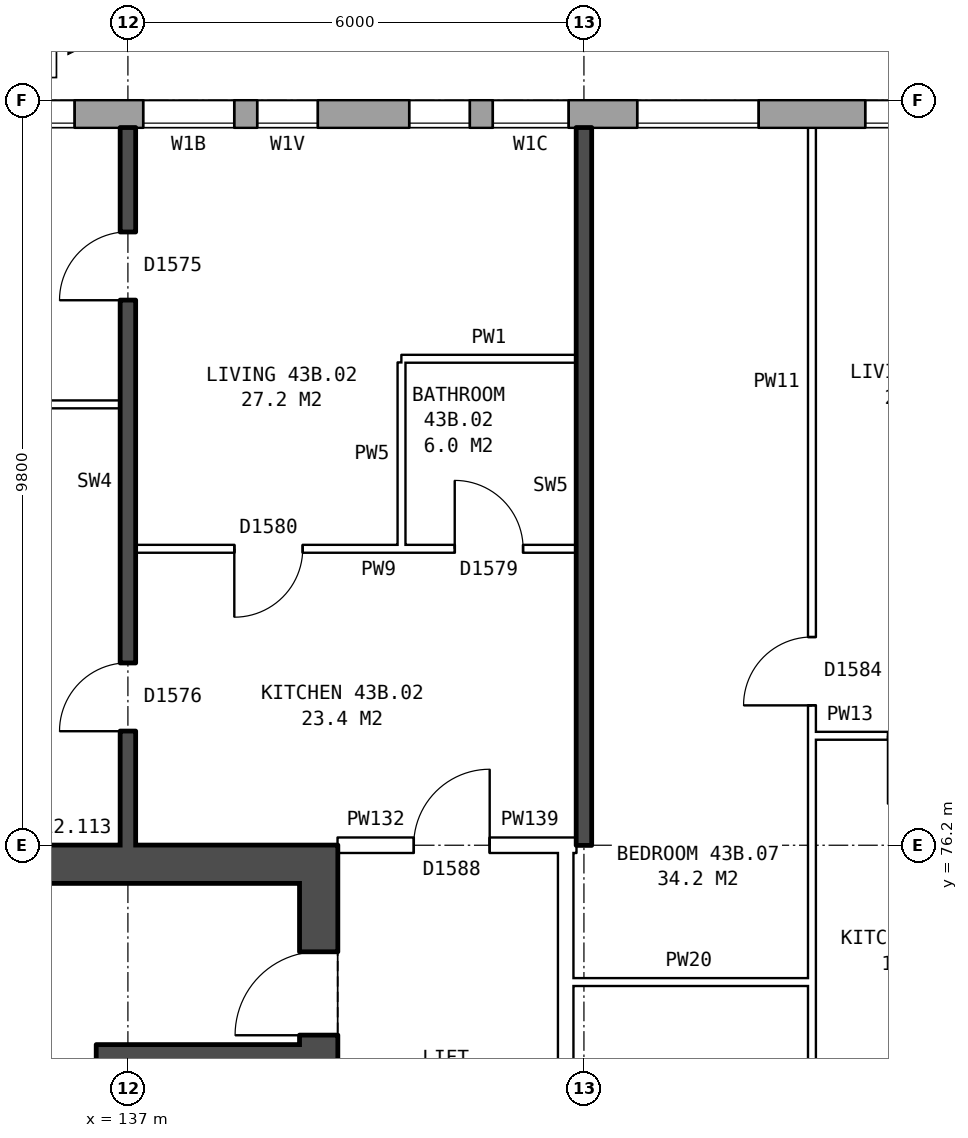
"""IFC4 building model, lengths in metres.
Left out: names, types, materials, properties, quantities, classifications, styles, units other than length and angle.
Written with IfcOpenShell. Run it as: python <this file> out.ifc"""

import sys

from ifc_helpers import new_model, si_unit, direction, frame, frame_2d, origin, place, context, subcontext, project, spatial, rectangle, extrude, element, fill, save


model = new_model("IFC4")
c1 = context("Model", 3, precision=1e-05, world=origin(), true_north=direction((0.0, 1.0)))
c2 = subcontext(c1, "Body", "Model", "MODEL_VIEW")
j1 = project(units=[si_unit("LENGTHUNIT", "METRE"), si_unit("PLANEANGLEUNIT", "RADIAN")], contexts=[c1])
p1 = place(None, origin())
s1 = spatial("IfcSite", under=j1, at=p1, CompositionType="ELEMENT")
p2 = place(p1, origin())
s2 = spatial("IfcBuilding", under=s1, at=p2, CompositionType="ELEMENT")
p3 = place(p2, frame((0.0, 0.0, 154.7)))
s3 = spatial("IfcBuildingStorey", under=s2, at=p3, CompositionType="ELEMENT", Elevation=154.7)
p4 = place(p3, frame((168.425, 85.82, 0.0), z_axis=(0.0, 0.0, 1.0), x_axis=(-1.0, 0.0, 0.0)))
e1 = element("IfcWall", 1, at=p4, inside=s3, PredefinedType="STANDARD", context=c2, shape_type="SweptSolid", body=[
    extrude(rectangle(XDim=34.351, YDim=0.36, at=frame_2d((17.175, 0.0))), origin(), (0.0, 0.0, 1.0), 2.85),
])
p5 = place(p4, frame((2.125, 0.0, 0.8)))
e2 = element("IfcOpeningElement", 2, at=p5, cuts=e1, PredefinedType="OPENING", context=c2, shape_type="SweptSolid", body=[
    extrude(rectangle(XDim=1.6, YDim=1.8, at=frame_2d((0.8, 0.9))), frame((0.0, 0.19, 0.0), z_axis=(0.0, -1.0, 0.0), x_axis=(1.0, 0.0, 0.0)), (0.0, 0.0, 1.0), 0.38),
])
p6 = place(p4, frame((4.025, 0.0, 1.7)))
e3 = element("IfcOpeningElement", 3, at=p6, cuts=e1, PredefinedType="OPENING", context=c2, shape_type="SweptSolid", body=[
    extrude(rectangle(XDim=1.4, YDim=0.9, at=frame_2d((0.7, 0.45))), frame((0.0, 0.19, 0.0), z_axis=(0.0, -1.0, 0.0), x_axis=(1.0, 0.0, 0.0)), (0.0, 0.0, 1.0), 0.38),
])
p7 = place(p4, frame((8.125, 0.0, 0.8)))
e4 = element("IfcOpeningElement", 4, at=p7, cuts=e1, PredefinedType="OPENING", context=c2, shape_type="SweptSolid", body=[
    extrude(rectangle(XDim=1.6, YDim=1.8, at=frame_2d((0.8, 0.9))), frame((0.0, 0.19, 0.0), z_axis=(0.0, -1.0, 0.0), x_axis=(1.0, 0.0, 0.0)), (0.0, 0.0, 1.0), 0.38),
])
p8 = place(p4, frame((11.125, 0.0, 0.8)))
e5 = element("IfcOpeningElement", 5, at=p8, cuts=e1, PredefinedType="OPENING", context=c2, shape_type="SweptSolid", body=[
    extrude(rectangle(XDim=1.6, YDim=1.8, at=frame_2d((0.8, 0.9))), frame((0.0, 0.19, 0.0), z_axis=(0.0, -1.0, 0.0), x_axis=(1.0, 0.0, 0.0)), (0.0, 0.0, 1.0), 0.38),
])
p9 = place(p4, frame((14.125, 0.0, 0.8)))
e6 = element("IfcOpeningElement", 6, at=p9, cuts=e1, PredefinedType="OPENING", context=c2, shape_type="SweptSolid", body=[
    extrude(rectangle(XDim=1.6, YDim=1.8, at=frame_2d((0.8, 0.9))), frame((0.0, 0.19, 0.0), z_axis=(0.0, -1.0, 0.0), x_axis=(1.0, 0.0, 0.0)), (0.0, 0.0, 1.0), 0.38),
])
p10 = place(p4, frame((17.125, 0.0, 0.8)))
e7 = element("IfcOpeningElement", 7, at=p10, cuts=e1, PredefinedType="OPENING", context=c2, shape_type="SweptSolid", body=[
    extrude(rectangle(XDim=1.6, YDim=1.8, at=frame_2d((0.8, 0.9))), frame((0.0, 0.19, 0.0), z_axis=(0.0, -1.0, 0.0), x_axis=(1.0, 0.0, 0.0)), (0.0, 0.0, 1.0), 0.38),
])
p11 = place(p4, frame((20.125, 0.0, 0.8)))
e8 = element("IfcOpeningElement", 8, at=p11, cuts=e1, PredefinedType="OPENING", context=c2, shape_type="SweptSolid", body=[
    extrude(rectangle(XDim=1.6, YDim=1.8, at=frame_2d((0.8, 0.9))), frame((0.0, 0.19, 0.0), z_axis=(0.0, -1.0, 0.0), x_axis=(1.0, 0.0, 0.0)), (0.0, 0.0, 1.0), 0.38),
])
p12 = place(p4, frame((23.125, 0.0, 0.8)))
e9 = element("IfcOpeningElement", 9, at=p12, cuts=e1, PredefinedType="OPENING", context=c2, shape_type="SweptSolid", body=[
    extrude(rectangle(XDim=1.6, YDim=1.8, at=frame_2d((0.8, 0.9))), frame((0.0, 0.19, 0.0), z_axis=(0.0, -1.0, 0.0), x_axis=(1.0, 0.0, 0.0)), (0.0, 0.0, 1.0), 0.38),
])
p13 = place(p4, frame((25.625, 0.0, 0.8)))
e10 = element("IfcOpeningElement", 10, at=p13, cuts=e1, PredefinedType="OPENING", context=c2, shape_type="SweptSolid", body=[
    extrude(rectangle(XDim=1.0, YDim=1.8, at=frame_2d((0.5, 0.9))), frame((0.0, 0.19, 0.0), z_axis=(0.0, -1.0, 0.0), x_axis=(1.0, 0.0, 0.0)), (0.0, 0.0, 1.0), 0.38),
])
p14 = place(p4, frame((26.925, 0.0, 0.8)))
e11 = element("IfcOpeningElement", 11, at=p14, cuts=e1, PredefinedType="OPENING", context=c2, shape_type="SweptSolid", body=[
    extrude(rectangle(XDim=0.8, YDim=0.9, at=frame_2d((0.4, 0.45))), frame((0.0, 0.19, 0.0), z_axis=(0.0, -1.0, 0.0), x_axis=(1.0, 0.0, 0.0)), (0.0, 0.0, 1.0), 0.38),
])
p15 = place(p4, frame((32.125, 0.0, 0.8)))
e12 = element("IfcOpeningElement", 12, at=p15, cuts=e1, PredefinedType="OPENING", context=c2, shape_type="SweptSolid", body=[
    extrude(rectangle(XDim=1.6, YDim=1.8, at=frame_2d((0.8, 0.9))), frame((0.0, 0.19, 0.0), z_axis=(0.0, -1.0, 0.0), x_axis=(1.0, 0.0, 0.0)), (0.0, 0.0, 1.0), 0.38),
])
p16 = place(p4, frame((6.625, 0.0, 0.8)))
e13 = element("IfcOpeningElement", 13, at=p16, cuts=e1, PredefinedType="OPENING", context=c2, shape_type="SweptSolid", body=[
    extrude(rectangle(XDim=0.6, YDim=0.9, at=frame_2d((0.3, 0.45))), frame((0.0, 0.19, 0.0), z_axis=(0.0, -1.0, 0.0), x_axis=(1.0, 0.0, 0.0)), (0.0, 0.0, 1.0), 0.38),
])
p17 = place(p4, frame((28.925, 0.0, 1.7)))
e14 = element("IfcOpeningElement", 14, at=p17, cuts=e1, PredefinedType="OPENING", context=c2, shape_type="SweptSolid", body=[
    extrude(rectangle(XDim=0.8, YDim=0.9, at=frame_2d((0.4, 0.45))), frame((0.0, 0.19, 0.0), z_axis=(0.0, -1.0, 0.0), x_axis=(1.0, 0.0, 0.0)), (0.0, 0.0, 1.0), 0.38),
])
p18 = place(p4, frame((30.025, 0.0, 0.8)))
e15 = element("IfcOpeningElement", 15, at=p18, cuts=e1, PredefinedType="OPENING", context=c2, shape_type="SweptSolid", body=[
    extrude(rectangle(XDim=1.2, YDim=1.8, at=frame_2d((0.6, 0.9))), frame((0.0, 0.19, 0.0), z_axis=(0.0, -1.0, 0.0), x_axis=(1.0, 0.0, 0.0)), (0.0, 0.0, 1.0), 0.38),
])
p19 = place(p3, frame((139.51, 63.8, 0.0), z_axis=(0.0, 0.0, 1.0), x_axis=(0.0, 1.0, 0.0)))
e16 = element("IfcWall", 16, at=p19, inside=s3, PredefinedType="SHEAR", context=c2, shape_type="SweptSolid", body=[
    extrude(rectangle(XDim=12.4, YDim=0.5, at=frame_2d((6.2, 0.0))), origin(), (0.0, 0.0, 1.0), 2.85),
])
p20 = place(p19, frame((1.325, 0.0, 0.0)))
e17 = element("IfcOpeningElement", 17, at=p20, cuts=e16, PredefinedType="OPENING", context=c2, shape_type="SweptSolid", body=[
    extrude(rectangle(XDim=1.1, YDim=2.1, at=frame_2d((0.55, 1.05))), frame((0.0, 0.26, 0.0), z_axis=(0.0, -1.0, 0.0), x_axis=(1.0, 0.0, 0.0)), (0.0, 0.0, 1.0), 0.52),
])
p21 = place(p19, frame((3.6, 0.0, 0.0)))
e18 = element("IfcOpeningElement", 18, at=p21, cuts=e16, PredefinedType="OPENING", context=c2, shape_type="SweptSolid", body=[
    extrude(rectangle(XDim=1.1, YDim=2.1, at=frame_2d((0.55, 1.05))), frame((0.0, 0.26, 0.0), z_axis=(0.0, -1.0, 0.0), x_axis=(1.0, 0.0, 0.0)), (0.0, 0.0, 1.0), 0.52),
])
p22 = place(p19, frame((5.8, 0.0, 0.0)))
e19 = element("IfcOpeningElement", 19, at=p22, cuts=e16, PredefinedType="OPENING", context=c2, shape_type="SweptSolid", body=[
    extrude(rectangle(XDim=1.1, YDim=2.1, at=frame_2d((0.55, 1.05))), frame((0.0, 0.26, 0.0), z_axis=(0.0, -1.0, 0.0), x_axis=(1.0, 0.0, 0.0)), (0.0, 0.0, 1.0), 0.52),
])
p23 = place(p19, frame((9.9, 0.0, 0.0)))
e20 = element("IfcOpeningElement", 20, at=p23, cuts=e16, PredefinedType="OPENING", context=c2, shape_type="SweptSolid", body=[
    extrude(rectangle(XDim=1.1, YDim=2.1, at=frame_2d((0.55, 1.05))), frame((0.0, 0.26, 0.0), z_axis=(0.0, -1.0, 0.0), x_axis=(1.0, 0.0, 0.0)), (0.0, 0.0, 1.0), 0.52),
])
p24 = place(p19, frame((8.125, 0.0, 0.0)))
e21 = element("IfcOpeningElement", 21, at=p24, cuts=e16, PredefinedType="OPENING", context=c2, shape_type="SweptSolid", body=[
    extrude(rectangle(XDim=0.85, YDim=2.1, at=frame_2d((0.425, 1.05))), frame((0.0, 0.26, 0.0), z_axis=(0.0, -1.0, 0.0), x_axis=(1.0, 0.0, 0.0)), (0.0, 0.0, 1.0), 0.52),
])
p25 = place(p3, frame((139.26, 75.95, 0.0), z_axis=(0.0, 0.0, 1.0), x_axis=(-1.0, 0.0, 0.0)))
e22 = element("IfcWall", 22, at=p25, inside=s3, PredefinedType="SHEAR", context=c2, shape_type="SweptSolid", body=[
    extrude(rectangle(XDim=7.4, YDim=0.5, at=frame_2d((3.7, 0.0))), origin(), (0.0, 0.0, 1.0), 2.85),
])
p26 = place(p3, frame((139.26, 73.45, 0.0), z_axis=(0.0, 0.0, 1.0), x_axis=(-1.0, 0.0, 0.0)))
e23 = element("IfcWall", 23, at=p26, inside=s3, PredefinedType="SHEAR", context=c2, shape_type="SweptSolid", body=[
    extrude(rectangle(XDim=2.425, YDim=0.25, at=frame_2d((1.212, 0.0))), origin(), (0.0, 0.0, 1.0), 2.85),
])
p27 = place(p3, frame((136.71, 71.375, 0.0), z_axis=(0.0, 0.0, 1.0), x_axis=(0.0, 1.0, 0.0)))
e24 = element("IfcWall", 24, at=p27, inside=s3, PredefinedType="SHEAR", context=c2, shape_type="SweptSolid", body=[
    extrude(rectangle(XDim=2.2, YDim=0.25, at=frame_2d((1.1, 0.0))), origin(), (0.0, 0.0, 1.0), 2.85),
])
p28 = place(p3, frame((142.76, 63.9, 0.0), z_axis=(0.0, 0.0, 1.0), x_axis=(0.0, 1.0, 0.0)))
e25 = element("IfcWall", 25, at=p28, inside=s3, PredefinedType="PARTITIONING", context=c2, shape_type="SweptSolid", body=[
    extrude(rectangle(XDim=12.2, YDim=0.2, at=frame_2d((6.1, 0.0))), origin(), (0.0, 0.0, 1.0), 2.85),
])
p29 = place(p28, frame((5.1, 0.0, 0.0)))
e26 = element("IfcOpeningElement", 26, at=p29, cuts=e25, PredefinedType="OPENING", context=c2, shape_type="SweptSolid", body=[
    extrude(rectangle(XDim=2.0, YDim=2.1, at=frame_2d((1.0, 1.05))), frame((0.0, 0.11, 0.0), z_axis=(0.0, -1.0, 0.0), x_axis=(1.0, 0.0, 0.0)), (0.0, 0.0, 1.0), 0.22),
])
p30 = place(p3, frame((142.76, 74.4, 0.0), z_axis=(0.0, 0.0, 1.0), x_axis=(1.0, 0.0, 0.0)))
e27 = element("IfcWall", 27, at=p30, inside=s3, PredefinedType="PARTITIONING", context=c2, shape_type="SweptSolid", body=[
    extrude(rectangle(XDim=3.24, YDim=0.1, at=frame_2d((1.62, 0.0))), origin(), (0.0, 0.0, 1.0), 2.85),
])
p31 = place(p3, frame((139.76, 76.2, 0.0), z_axis=(0.0, 0.0, 1.0), x_axis=(1.0, 0.0, 0.0)))
e28 = element("IfcWall", 28, at=p31, inside=s3, PredefinedType="PARTITIONING", context=c2, shape_type="SweptSolid", body=[
    extrude(rectangle(XDim=3.0, YDim=0.2, at=frame_2d((1.5, 0.0))), origin(), (0.0, 0.0, 1.0), 2.85),
])
p32 = place(p31, frame((1.0, 0.0, 0.0)))
e29 = element("IfcOpeningElement", 29, at=p32, cuts=e28, PredefinedType="OPENING", context=c2, shape_type="SweptSolid", body=[
    extrude(rectangle(XDim=1.0, YDim=2.1, at=frame_2d((0.5, 1.05))), frame((0.0, 0.11, 0.0), z_axis=(0.0, -1.0, 0.0), x_axis=(1.0, 0.0, 0.0)), (0.0, 0.0, 1.0), 0.22),
])
p33 = place(p3, frame((142.76, 76.2, 0.0), z_axis=(0.0, 0.0, 1.0), x_axis=(1.0, 0.0, 0.0)))
e30 = element("IfcWall", 30, at=p33, inside=s3, PredefinedType="PARTITIONING", context=c2, shape_type="SweptSolid", body=[
    extrude(rectangle(XDim=0.14, YDim=0.2, at=frame_2d((0.07, 0.0))), origin(), (0.0, 0.0, 1.0), 2.85),
])
p34 = place(p3, frame((146.0, 77.64, 0.0), z_axis=(0.0, 0.0, 1.0), x_axis=(1.0, 0.0, 0.0)))
e31 = element("IfcWall", 31, at=p34, inside=s3, PredefinedType="PARTITIONING", context=c2, shape_type="SweptSolid", body=[
    extrude(rectangle(XDim=2.9, YDim=0.1, at=frame_2d((1.45, 0.0))), origin(), (0.0, 0.0, 1.0), 2.85),
])
p35 = place(p34, frame((1.0, 0.0, 0.0)))
e32 = element("IfcOpeningElement", 32, at=p35, cuts=e31, PredefinedType="OPENING", context=c2, shape_type="SweptSolid", body=[
    extrude(rectangle(XDim=0.9, YDim=2.1, at=frame_2d((0.45, 1.05))), frame((0.0, 0.06, 0.0), z_axis=(0.0, -1.0, 0.0), x_axis=(1.0, 0.0, 0.0)), (0.0, 0.0, 1.0), 0.12),
])
p36 = place(p3, frame((137.1, 80.1, 0.0), z_axis=(0.0, 0.0, 1.0), x_axis=(1.0, 0.0, 0.0)))
e33 = element("IfcWall", 33, at=p36, inside=s3, PredefinedType="PARTITIONING", context=c2, shape_type="SweptSolid", body=[
    extrude(rectangle(XDim=5.8, YDim=0.1, at=frame_2d((2.9, 0.0))), origin(), (0.0, 0.0, 1.0), 2.85),
])
p37 = place(p36, frame((1.3, 0.0, 0.0)))
e34 = element("IfcOpeningElement", 34, at=p37, cuts=e33, PredefinedType="OPENING", context=c2, shape_type="SweptSolid", body=[
    extrude(rectangle(XDim=0.9, YDim=2.1, at=frame_2d((0.45, 1.05))), frame((0.0, 0.06, 0.0), z_axis=(0.0, -1.0, 0.0), x_axis=(1.0, 0.0, 0.0)), (0.0, 0.0, 1.0), 0.12),
])
p38 = place(p36, frame((4.2, 0.0, 0.0)))
e35 = element("IfcOpeningElement", 35, at=p38, cuts=e33, PredefinedType="OPENING", context=c2, shape_type="SweptSolid", body=[
    extrude(rectangle(XDim=0.9, YDim=2.1, at=frame_2d((0.45, 1.05))), frame((0.0, 0.06, 0.0), z_axis=(0.0, -1.0, 0.0), x_axis=(1.0, 0.0, 0.0)), (0.0, 0.0, 1.0), 0.12),
])
p39 = place(p3, frame((131.36, 82.0, 0.0), z_axis=(0.0, 0.0, 1.0), x_axis=(1.0, 0.0, 0.0)))
e36 = element("IfcWall", 36, at=p39, inside=s3, PredefinedType="PARTITIONING", context=c2, shape_type="SweptSolid", body=[
    extrude(rectangle(XDim=5.54, YDim=0.1, at=frame_2d((2.77, 0.0))), origin(), (0.0, 0.0, 1.0), 2.85),
])
p40 = place(p3, frame((140.6, 82.6, 0.0), z_axis=(0.0, 0.0, 1.0), x_axis=(1.0, 0.0, 0.0)))
e37 = element("IfcWall", 37, at=p40, inside=s3, PredefinedType="PARTITIONING", context=c2, shape_type="SweptSolid", body=[
    extrude(rectangle(XDim=2.3, YDim=0.1, at=frame_2d((1.15, 0.0))), origin(), (0.0, 0.0, 1.0), 2.85),
])
p41 = place(p3, frame((137.0, 76.2, 0.0), z_axis=(0.0, 0.0, 1.0), x_axis=(0.0, 1.0, 0.0)))
e38 = element("IfcWall", 38, at=p41, inside=s3, PredefinedType="SOLIDWALL", context=c2, shape_type="SweptSolid", body=[
    extrude(rectangle(XDim=9.44, YDim=0.2, at=frame_2d((4.72, 0.0))), origin(), (0.0, 0.0, 1.0), 2.85),
])
p42 = place(p41, frame((7.17, 0.0, 0.0)))
e39 = element("IfcOpeningElement", 39, at=p42, cuts=e38, PredefinedType="OPENING", context=c2, shape_type="SweptSolid", body=[
    extrude(rectangle(XDim=0.9, YDim=2.1, at=frame_2d((0.45, 1.05))), frame((0.0, 0.11, 0.0), z_axis=(0.0, -1.0, 0.0), x_axis=(1.0, 0.0, 0.0)), (0.0, 0.0, 1.0), 0.22),
])
p43 = place(p41, frame((1.5, 0.0, 0.0)))
e40 = element("IfcOpeningElement", 40, at=p43, cuts=e38, PredefinedType="OPENING", context=c2, shape_type="SweptSolid", body=[
    extrude(rectangle(XDim=0.9, YDim=2.1, at=frame_2d((0.45, 1.05))), frame((0.0, 0.11, 0.0), z_axis=(0.0, -1.0, 0.0), x_axis=(1.0, 0.0, 0.0)), (0.0, 0.0, 1.0), 0.22),
])
p44 = place(p3, frame((140.6, 80.15, 0.0), z_axis=(0.0, 0.0, 1.0), x_axis=(0.0, 1.0, 0.0)))
e41 = element("IfcWall", 41, at=p44, inside=s3, PredefinedType="PARTITIONING", context=c2, shape_type="SweptSolid", body=[
    extrude(rectangle(XDim=2.4, YDim=0.1, at=frame_2d((1.2, 0.0))), origin(), (0.0, 0.0, 1.0), 2.85),
])
p45 = place(p3, frame((143.0, 76.2, 0.0), z_axis=(0.0, 0.0, 1.0), x_axis=(0.0, 1.0, 0.0)))
e42 = element("IfcWall", 42, at=p45, inside=s3, PredefinedType="SOLIDWALL", context=c2, shape_type="SweptSolid", body=[
    extrude(rectangle(XDim=9.44, YDim=0.2, at=frame_2d((4.72, 0.0))), origin(), (0.0, 0.0, 1.0), 2.85),
])
p46 = place(p3, frame((146.0, 71.3, 0.0), z_axis=(0.0, 0.0, 1.0), x_axis=(0.0, 1.0, 0.0)))
e43 = element("IfcWall", 43, at=p46, inside=s3, PredefinedType="PARTITIONING", context=c2, shape_type="SweptSolid", body=[
    extrude(rectangle(XDim=14.34, YDim=0.1, at=frame_2d((7.17, 0.0))), origin(), (0.0, 0.0, 1.0), 2.85),
])
p47 = place(p46, frame((6.74, 0.0, 0.0)))
e44 = element("IfcOpeningElement", 44, at=p47, cuts=e43, PredefinedType="OPENING", context=c2, shape_type="SweptSolid", body=[
    extrude(rectangle(XDim=0.9, YDim=2.1, at=frame_2d((0.45, 1.05))), frame((0.0, 0.06, 0.0), z_axis=(0.0, -1.0, 0.0), x_axis=(1.0, 0.0, 0.0)), (0.0, 0.0, 1.0), 0.12),
])
p48 = place(p46, frame((0.4, 0.0, 0.0)))
e45 = element("IfcOpeningElement", 45, at=p48, cuts=e43, PredefinedType="OPENING", context=c2, shape_type="SweptSolid", body=[
    extrude(rectangle(XDim=0.9, YDim=2.1, at=frame_2d((0.45, 1.05))), frame((0.0, 0.06, 0.0), z_axis=(0.0, -1.0, 0.0), x_axis=(1.0, 0.0, 0.0)), (0.0, 0.0, 1.0), 0.12),
])
p49 = place(p11, origin())
e46 = element("IfcWindow", 46, at=p49, inside=s3, PartitioningType="SINGLE_PANEL", PredefinedType="WINDOW", context=c2, shape_type="SweptSolid", body=[
    extrude(rectangle(XDim=1.6, YDim=1.8, at=frame_2d((0.8, 0.9))), frame((0.0, 0.15, 0.0), z_axis=(0.0, -1.0, 0.0), x_axis=(1.0, 0.0, 0.0)), (0.0, 0.0, 1.0), 0.06),
])
fill(e8, e46)
p50 = place(p12, origin())
e47 = element("IfcWindow", 47, at=p50, inside=s3, PartitioningType="SINGLE_PANEL", PredefinedType="WINDOW", context=c2, shape_type="SweptSolid", body=[
    extrude(rectangle(XDim=1.6, YDim=1.8, at=frame_2d((0.8, 0.9))), frame((0.0, 0.15, 0.0), z_axis=(0.0, -1.0, 0.0), x_axis=(1.0, 0.0, 0.0)), (0.0, 0.0, 1.0), 0.06),
])
fill(e9, e47)
p51 = place(p13, origin())
e48 = element("IfcWindow", 48, at=p51, inside=s3, PartitioningType="SINGLE_PANEL", PredefinedType="WINDOW", context=c2, shape_type="SweptSolid", body=[
    extrude(rectangle(XDim=1.0, YDim=1.8, at=frame_2d((0.5, 0.9))), frame((0.0, 0.15, 0.0), z_axis=(0.0, -1.0, 0.0), x_axis=(1.0, 0.0, 0.0)), (0.0, 0.0, 1.0), 0.06),
])
fill(e10, e48)
p52 = place(p14, origin())
e49 = element("IfcWindow", 49, at=p52, inside=s3, PartitioningType="SINGLE_PANEL", PredefinedType="WINDOW", context=c2, shape_type="SweptSolid", body=[
    extrude(rectangle(XDim=0.8, YDim=0.9, at=frame_2d((0.4, 0.45))), frame((0.0, 0.15, 0.0), z_axis=(0.0, -1.0, 0.0), x_axis=(1.0, 0.0, 0.0)), (0.0, 0.0, 1.0), 0.06),
])
fill(e11, e49)
p53 = place(p15, origin())
e50 = element("IfcWindow", 50, at=p53, inside=s3, PartitioningType="SINGLE_PANEL", PredefinedType="WINDOW", context=c2, shape_type="SweptSolid", body=[
    extrude(rectangle(XDim=1.6, YDim=1.8, at=frame_2d((0.8, 0.9))), frame((0.0, 0.15, 0.0), z_axis=(0.0, -1.0, 0.0), x_axis=(1.0, 0.0, 0.0)), (0.0, 0.0, 1.0), 0.06),
])
fill(e12, e50)
p54 = place(p23, origin())
e51 = element("IfcDoor", 51, at=p54, inside=s3, OperationType="SINGLE_SWING_LEFT", PredefinedType="DOOR", context=c2, shape_type="SweptSolid", body=[
    extrude(rectangle(XDim=1.1, YDim=2.1, at=frame_2d((0.55, 1.05))), frame((0.0, 0.235, 0.0), z_axis=(0.0, -1.0, 0.0), x_axis=(1.0, 0.0, 0.0)), (0.0, 0.0, 1.0), 0.05),
])
fill(e20, e51)
p55 = place(p42, origin())
e52 = element("IfcDoor", 52, at=p55, inside=s3, OperationType="SINGLE_SWING_LEFT", PredefinedType="DOOR", context=c2, shape_type="SweptSolid", body=[
    extrude(rectangle(XDim=0.9, YDim=2.1, at=frame_2d((0.45, 1.05))), frame((0.0, 0.025, 0.0), z_axis=(0.0, -1.0, 0.0), x_axis=(1.0, 0.0, 0.0)), (0.0, 0.0, 1.0), 0.05),
])
fill(e39, e52)
p56 = place(p43, origin())
e53 = element("IfcDoor", 53, at=p56, inside=s3, OperationType="SINGLE_SWING_LEFT", PredefinedType="DOOR", context=c2, shape_type="SweptSolid", body=[
    extrude(rectangle(XDim=0.9, YDim=2.1, at=frame_2d((0.45, 1.05))), frame((0.0, 0.025, 0.0), z_axis=(0.0, -1.0, 0.0), x_axis=(1.0, 0.0, 0.0)), (0.0, 0.0, 1.0), 0.05),
])
fill(e40, e53)
p57 = place(p32, origin())
e54 = element("IfcDoor", 54, at=p57, inside=s3, OperationType="SINGLE_SWING_RIGHT", PredefinedType="DOOR", context=c2, shape_type="SweptSolid", body=[
    extrude(rectangle(XDim=1.0, YDim=2.1, at=frame_2d((0.5, 1.05))), frame((0.0, 0.025, 0.0), z_axis=(0.0, -1.0, 0.0), x_axis=(1.0, 0.0, 0.0)), (0.0, 0.0, 1.0), 0.05),
])
fill(e29, e54)
p58 = place(p37, frame((0.9, 0.0, 0.0), z_axis=(0.0, 0.0, 1.0), x_axis=(-1.0, 0.0, 0.0)))
e55 = element("IfcDoor", 55, at=p58, inside=s3, OperationType="SINGLE_SWING_RIGHT", PredefinedType="DOOR", context=c2, shape_type="SweptSolid", body=[
    extrude(rectangle(XDim=0.9, YDim=2.1, at=frame_2d((0.45, 1.05))), frame((0.0, 0.025, 0.0), z_axis=(0.0, -1.0, 0.0), x_axis=(1.0, 0.0, 0.0)), (0.0, 0.0, 1.0), 0.05),
])
fill(e34, e55)
p59 = place(p38, origin())
e56 = element("IfcDoor", 56, at=p59, inside=s3, OperationType="SINGLE_SWING_LEFT", PredefinedType="DOOR", context=c2, shape_type="SweptSolid", body=[
    extrude(rectangle(XDim=0.9, YDim=2.1, at=frame_2d((0.45, 1.05))), frame((0.0, 0.025, 0.0), z_axis=(0.0, -1.0, 0.0), x_axis=(1.0, 0.0, 0.0)), (0.0, 0.0, 1.0), 0.05),
])
fill(e35, e56)
p60 = place(p47, origin())
e57 = element("IfcDoor", 57, at=p60, inside=s3, OperationType="SINGLE_SWING_LEFT", PredefinedType="DOOR", context=c2, shape_type="SweptSolid", body=[
    extrude(rectangle(XDim=0.9, YDim=2.1, at=frame_2d((0.45, 1.05))), frame((0.0, 0.025, 0.0), z_axis=(0.0, -1.0, 0.0), x_axis=(1.0, 0.0, 0.0)), (0.0, 0.0, 1.0), 0.05),
])
fill(e44, e57)
p61 = place(p17, origin())
e58 = element("IfcWindow", 58, at=p61, inside=s3, PartitioningType="SINGLE_PANEL", PredefinedType="WINDOW", context=c2, shape_type="SweptSolid", body=[
    extrude(rectangle(XDim=0.8, YDim=0.9, at=frame_2d((0.4, 0.45))), frame((0.0, 0.15, 0.0), z_axis=(0.0, -1.0, 0.0), x_axis=(1.0, 0.0, 0.0)), (0.0, 0.0, 1.0), 0.06),
])
fill(e14, e58)
p62 = place(p18, origin())
e59 = element("IfcWindow", 59, at=p62, inside=s3, PartitioningType="SINGLE_PANEL", PredefinedType="WINDOW", context=c2, shape_type="SweptSolid", body=[
    extrude(rectangle(XDim=1.2, YDim=1.8, at=frame_2d((0.6, 0.9))), frame((0.0, 0.15, 0.0), z_axis=(0.0, -1.0, 0.0), x_axis=(1.0, 0.0, 0.0)), (0.0, 0.0, 1.0), 0.06),
])
fill(e15, e59)
save(model, sys.argv[1])
